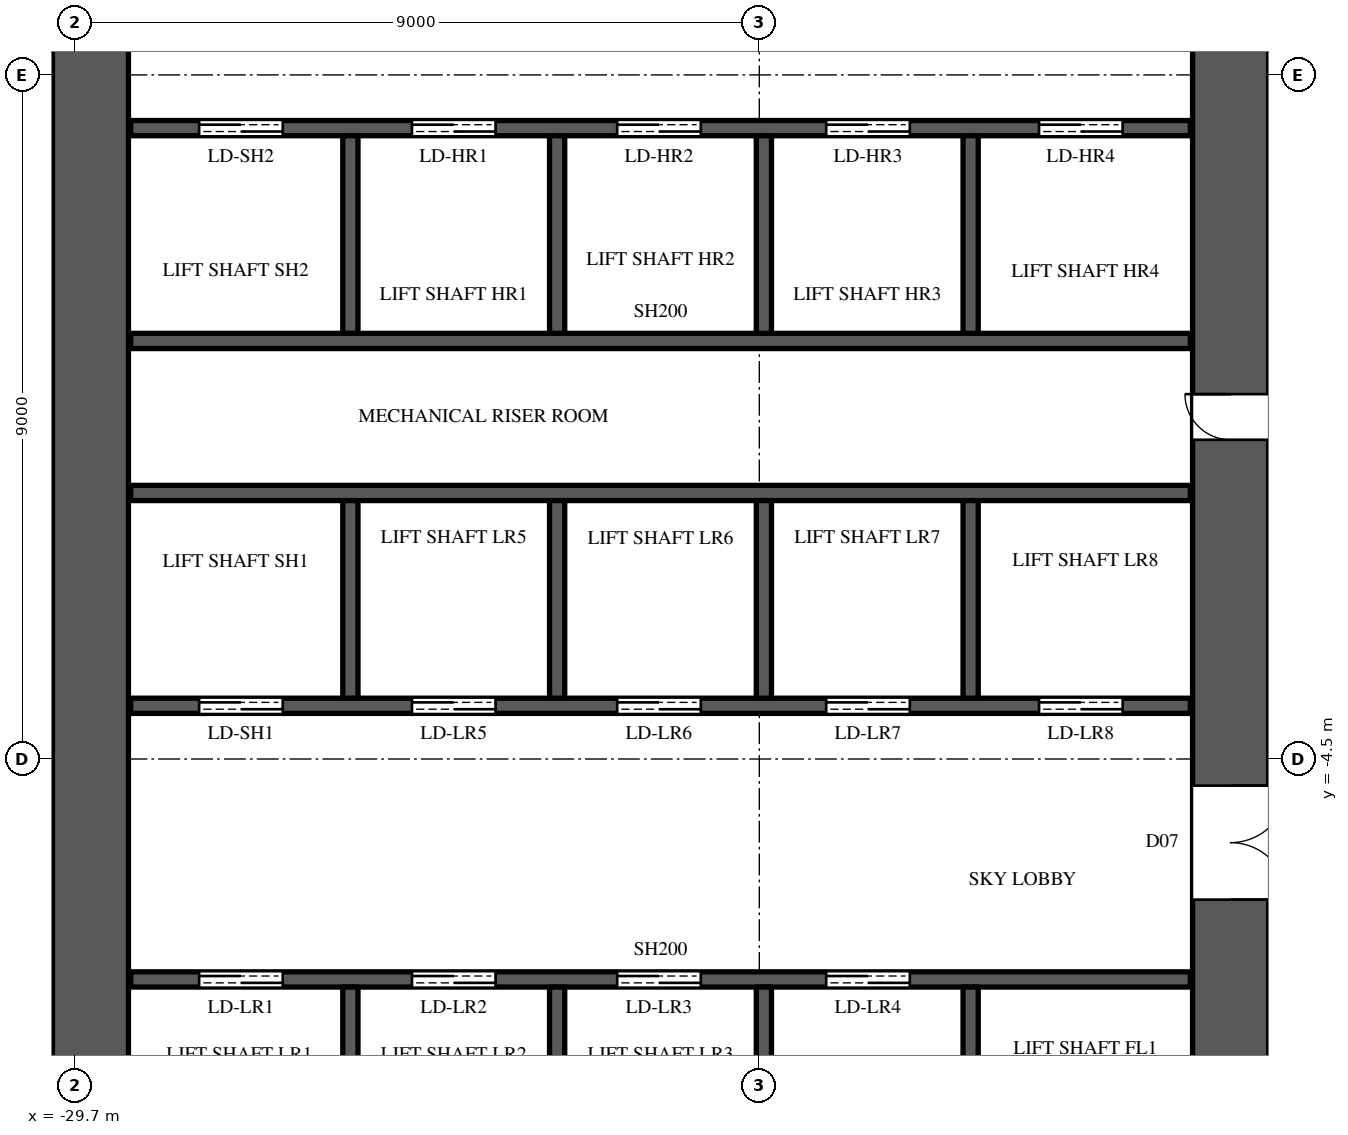
"""IFC4 building model, lengths in metres.
Left out: names, types, materials, properties, quantities, classifications, styles, units other than length and angle.
Written with IfcOpenShell. Run it as: python <this file> out.ifc"""

import sys

from ifc_helpers import new_model, si_unit, direction, frame, frame_2d, origin, place, context, subcontext, project, spatial, rectangle, extrude, element, fill, save


model = new_model("IFC4")
c1 = context("Model", 3, precision=1e-05, world=origin(), true_north=direction((0.0, 1.0)))
c2 = subcontext(c1, "Body", "Model", "MODEL_VIEW")
j1 = project(units=[si_unit("LENGTHUNIT", "METRE"), si_unit("PLANEANGLEUNIT", "RADIAN")], contexts=[c1])
p1 = place(None, origin())
s1 = spatial("IfcSite", under=j1, at=p1, CompositionType="ELEMENT")
p2 = place(p1, origin())
s2 = spatial("IfcBuilding", under=s1, at=p2, CompositionType="ELEMENT")
p3 = place(p2, frame((0.0, 0.0, 145.5)))
s3 = spatial("IfcBuildingStorey", under=s2, at=p3, CompositionType="ELEMENT", Elevation=145.5)
p4 = place(p3, frame((-14.5, -14.8, 0.0), z_axis=(0.0, 0.0, 1.0), x_axis=(0.0, 1.0, 0.0)))
e1 = element("IfcWall", 1, at=p4, inside=s3, PredefinedType="SHEAR", context=c2, shape_type="SweptSolid", body=[
    extrude(rectangle(XDim=29.6, YDim=1.0, at=frame_2d((14.8, 0.0))), origin(), (0.0, 0.0, 1.0), 7.0),
])
p5 = place(p4, frame((1.55, 0.0, 0.0)))
e2 = element("IfcOpeningElement", 2, at=p5, cuts=e1, PredefinedType="OPENING", context=c2, shape_type="SweptSolid", body=[
    extrude(rectangle(XDim=1.5, YDim=2.4, at=frame_2d((0.75, 1.2))), frame((0.0, 0.51, 0.0), z_axis=(0.0, -1.0, 0.0), x_axis=(1.0, 0.0, 0.0)), (0.0, 0.0, 1.0), 1.02),
])
p6 = place(p4, frame((26.55, 0.0, 0.0)))
e3 = element("IfcOpeningElement", 3, at=p6, cuts=e1, PredefinedType="OPENING", context=c2, shape_type="SweptSolid", body=[
    extrude(rectangle(XDim=1.5, YDim=2.4, at=frame_2d((0.75, 1.2))), frame((0.0, 0.51, 0.0), z_axis=(0.0, -1.0, 0.0), x_axis=(1.0, 0.0, 0.0)), (0.0, 0.0, 1.0), 1.02),
])
p7 = place(p4, frame((8.45, 0.0, 0.0)))
e4 = element("IfcOpeningElement", 4, at=p7, cuts=e1, PredefinedType="OPENING", context=c2, shape_type="SweptSolid", body=[
    extrude(rectangle(XDim=1.5, YDim=2.4, at=frame_2d((0.75, 1.2))), frame((0.0, 0.51, 0.0), z_axis=(0.0, -1.0, 0.0), x_axis=(1.0, 0.0, 0.0)), (0.0, 0.0, 1.0), 1.02),
])
p8 = place(p4, frame((19.65, 0.0, 0.0)))
e5 = element("IfcOpeningElement", 5, at=p8, cuts=e1, PredefinedType="OPENING", context=c2, shape_type="SweptSolid", body=[
    extrude(rectangle(XDim=1.5, YDim=2.4, at=frame_2d((0.75, 1.2))), frame((0.0, 0.51, 0.0), z_axis=(0.0, -1.0, 0.0), x_axis=(1.0, 0.0, 0.0)), (0.0, 0.0, 1.0), 1.02),
])
p9 = place(p4, frame((14.5, 0.0, 0.0)))
e6 = element("IfcOpeningElement", 6, at=p9, cuts=e1, PredefinedType="OPENING", context=c2, shape_type="SweptSolid", body=[
    extrude(rectangle(XDim=0.6, YDim=2.0, at=frame_2d((0.3, 1.0))), frame((0.0, 0.51, 0.0), z_axis=(0.0, -1.0, 0.0), x_axis=(1.0, 0.0, 0.0)), (0.0, 0.0, 1.0), 1.02),
])
p10 = place(p3, frame((-29.5, -10.2, 0.0), z_axis=(0.0, 0.0, 1.0), x_axis=(0.0, 1.0, 0.0)))
e7 = element("IfcWall", 7, at=p10, inside=s3, PredefinedType="SHEAR", context=c2, shape_type="SweptSolid", body=[
    extrude(rectangle(XDim=20.4, YDim=1.0, at=frame_2d((10.2, 0.0))), origin(), (0.0, 0.0, 1.0), 7.0),
])
p11 = place(p3, frame((-28.97, -7.4, 0.0), z_axis=(0.0, 0.0, 1.0), x_axis=(1.0, 0.0, 0.0)))
e8 = element("IfcWall", 8, at=p11, inside=s3, PredefinedType="SHEAR", context=c2, shape_type="SweptSolid", body=[
    extrude(rectangle(XDim=13.94, YDim=0.2, at=frame_2d((6.97, 0.0))), origin(), (0.0, 0.0, 1.0), 6.7),
])
p12 = place(p11, frame((0.9, 0.0, 0.0)))
e9 = element("IfcOpeningElement", 9, at=p12, cuts=e8, PredefinedType="OPENING", context=c2, shape_type="SweptSolid", body=[
    extrude(rectangle(XDim=1.1, YDim=2.2, at=frame_2d((0.55, 1.1))), frame((0.0, 0.11, 0.0), z_axis=(0.0, -1.0, 0.0), x_axis=(1.0, 0.0, 0.0)), (0.0, 0.0, 1.0), 0.22),
])
p13 = place(p11, frame((3.7, 0.0, 0.0)))
e10 = element("IfcOpeningElement", 10, at=p13, cuts=e8, PredefinedType="OPENING", context=c2, shape_type="SweptSolid", body=[
    extrude(rectangle(XDim=1.1, YDim=2.2, at=frame_2d((0.55, 1.1))), frame((0.0, 0.11, 0.0), z_axis=(0.0, -1.0, 0.0), x_axis=(1.0, 0.0, 0.0)), (0.0, 0.0, 1.0), 0.22),
])
p14 = place(p11, frame((6.4, 0.0, 0.0)))
e11 = element("IfcOpeningElement", 11, at=p14, cuts=e8, PredefinedType="OPENING", context=c2, shape_type="SweptSolid", body=[
    extrude(rectangle(XDim=1.1, YDim=2.2, at=frame_2d((0.55, 1.1))), frame((0.0, 0.11, 0.0), z_axis=(0.0, -1.0, 0.0), x_axis=(1.0, 0.0, 0.0)), (0.0, 0.0, 1.0), 0.22),
])
p15 = place(p11, frame((9.15, 0.0, 0.0)))
e12 = element("IfcOpeningElement", 12, at=p15, cuts=e8, PredefinedType="OPENING", context=c2, shape_type="SweptSolid", body=[
    extrude(rectangle(XDim=1.1, YDim=2.2, at=frame_2d((0.55, 1.1))), frame((0.0, 0.11, 0.0), z_axis=(0.0, -1.0, 0.0), x_axis=(1.0, 0.0, 0.0)), (0.0, 0.0, 1.0), 0.22),
])
p16 = place(p3, frame((-28.97, -3.8, 0.0), z_axis=(0.0, 0.0, 1.0), x_axis=(1.0, 0.0, 0.0)))
e13 = element("IfcWall", 13, at=p16, inside=s3, PredefinedType="SHEAR", context=c2, shape_type="SweptSolid", body=[
    extrude(rectangle(XDim=13.94, YDim=0.2, at=frame_2d((6.97, 0.0))), origin(), (0.0, 0.0, 1.0), 6.7),
])
p17 = place(p16, frame((0.9, 0.0, 0.0)))
e14 = element("IfcOpeningElement", 14, at=p17, cuts=e13, PredefinedType="OPENING", context=c2, shape_type="SweptSolid", body=[
    extrude(rectangle(XDim=1.1, YDim=2.2, at=frame_2d((0.55, 1.1))), frame((0.0, 0.11, 0.0), z_axis=(0.0, -1.0, 0.0), x_axis=(1.0, 0.0, 0.0)), (0.0, 0.0, 1.0), 0.22),
])
p18 = place(p16, frame((3.7, 0.0, 0.0)))
e15 = element("IfcOpeningElement", 15, at=p18, cuts=e13, PredefinedType="OPENING", context=c2, shape_type="SweptSolid", body=[
    extrude(rectangle(XDim=1.1, YDim=2.2, at=frame_2d((0.55, 1.1))), frame((0.0, 0.11, 0.0), z_axis=(0.0, -1.0, 0.0), x_axis=(1.0, 0.0, 0.0)), (0.0, 0.0, 1.0), 0.22),
])
p19 = place(p16, frame((6.4, 0.0, 0.0)))
e16 = element("IfcOpeningElement", 16, at=p19, cuts=e13, PredefinedType="OPENING", context=c2, shape_type="SweptSolid", body=[
    extrude(rectangle(XDim=1.1, YDim=2.2, at=frame_2d((0.55, 1.1))), frame((0.0, 0.11, 0.0), z_axis=(0.0, -1.0, 0.0), x_axis=(1.0, 0.0, 0.0)), (0.0, 0.0, 1.0), 0.22),
])
p20 = place(p16, frame((9.15, 0.0, 0.0)))
e17 = element("IfcOpeningElement", 17, at=p20, cuts=e13, PredefinedType="OPENING", context=c2, shape_type="SweptSolid", body=[
    extrude(rectangle(XDim=1.1, YDim=2.2, at=frame_2d((0.55, 1.1))), frame((0.0, 0.11, 0.0), z_axis=(0.0, -1.0, 0.0), x_axis=(1.0, 0.0, 0.0)), (0.0, 0.0, 1.0), 0.22),
])
p21 = place(p16, frame((11.95, 0.0, 0.0)))
e18 = element("IfcOpeningElement", 18, at=p21, cuts=e13, PredefinedType="OPENING", context=c2, shape_type="SweptSolid", body=[
    extrude(rectangle(XDim=1.1, YDim=2.2, at=frame_2d((0.55, 1.1))), frame((0.0, 0.11, 0.0), z_axis=(0.0, -1.0, 0.0), x_axis=(1.0, 0.0, 0.0)), (0.0, 0.0, 1.0), 0.22),
])
for number, where, z_axis, x_axis in (
    (19, (-28.97, -1.0, 0.0), (0.0, 0.0, 1.0), (1.0, 0.0, 0.0)),
    (20, (-28.97, 1.0, 0.0), (0.0, 0.0, 1.0), (1.0, 0.0, 0.0)),
):
    element("IfcWall", number, at=place(p3, frame(where, z_axis=z_axis, x_axis=x_axis)), inside=s3, PredefinedType="SHEAR", context=c2, shape_type="SweptSolid", body=[
        extrude(rectangle(XDim=13.94, YDim=0.2, at=frame_2d((6.97, 0.0))), origin(), (0.0, 0.0, 1.0), 6.7),
    ])
p22 = place(p3, frame((-28.97, 3.8, 0.0), z_axis=(0.0, 0.0, 1.0), x_axis=(1.0, 0.0, 0.0)))
e21 = element("IfcWall", 21, at=p22, inside=s3, PredefinedType="SHEAR", context=c2, shape_type="SweptSolid", body=[
    extrude(rectangle(XDim=13.94, YDim=0.2, at=frame_2d((6.97, 0.0))), origin(), (0.0, 0.0, 1.0), 6.7),
])
p23 = place(p22, frame((0.9, 0.0, 0.0)))
e22 = element("IfcOpeningElement", 22, at=p23, cuts=e21, PredefinedType="OPENING", context=c2, shape_type="SweptSolid", body=[
    extrude(rectangle(XDim=1.1, YDim=2.2, at=frame_2d((0.55, 1.1))), frame((0.0, 0.11, 0.0), z_axis=(0.0, -1.0, 0.0), x_axis=(1.0, 0.0, 0.0)), (0.0, 0.0, 1.0), 0.22),
])
p24 = place(p22, frame((3.7, 0.0, 0.0)))
e23 = element("IfcOpeningElement", 23, at=p24, cuts=e21, PredefinedType="OPENING", context=c2, shape_type="SweptSolid", body=[
    extrude(rectangle(XDim=1.1, YDim=2.2, at=frame_2d((0.55, 1.1))), frame((0.0, 0.11, 0.0), z_axis=(0.0, -1.0, 0.0), x_axis=(1.0, 0.0, 0.0)), (0.0, 0.0, 1.0), 0.22),
])
p25 = place(p22, frame((6.4, 0.0, 0.0)))
e24 = element("IfcOpeningElement", 24, at=p25, cuts=e21, PredefinedType="OPENING", context=c2, shape_type="SweptSolid", body=[
    extrude(rectangle(XDim=1.1, YDim=2.2, at=frame_2d((0.55, 1.1))), frame((0.0, 0.11, 0.0), z_axis=(0.0, -1.0, 0.0), x_axis=(1.0, 0.0, 0.0)), (0.0, 0.0, 1.0), 0.22),
])
p26 = place(p22, frame((9.15, 0.0, 0.0)))
e25 = element("IfcOpeningElement", 25, at=p26, cuts=e21, PredefinedType="OPENING", context=c2, shape_type="SweptSolid", body=[
    extrude(rectangle(XDim=1.1, YDim=2.2, at=frame_2d((0.55, 1.1))), frame((0.0, 0.11, 0.0), z_axis=(0.0, -1.0, 0.0), x_axis=(1.0, 0.0, 0.0)), (0.0, 0.0, 1.0), 0.22),
])
p27 = place(p22, frame((11.95, 0.0, 0.0)))
e26 = element("IfcOpeningElement", 26, at=p27, cuts=e21, PredefinedType="OPENING", context=c2, shape_type="SweptSolid", body=[
    extrude(rectangle(XDim=1.1, YDim=2.2, at=frame_2d((0.55, 1.1))), frame((0.0, 0.11, 0.0), z_axis=(0.0, -1.0, 0.0), x_axis=(1.0, 0.0, 0.0)), (0.0, 0.0, 1.0), 0.22),
])
p28 = place(p3, frame((-26.08, -10.075, 0.0), z_axis=(0.0, 0.0, 1.0), x_axis=(0.0, 1.0, 0.0)))
e27 = element("IfcWall", 27, at=p28, inside=s3, PredefinedType="SHEAR", context=c2, shape_type="SweptSolid", body=[
    extrude(rectangle(XDim=2.575, YDim=0.2, at=frame_2d((1.288, 0.0))), origin(), (0.0, 0.0, 1.0), 6.7),
])
for number, where, z_axis, x_axis in (
    (28, (-26.08, -3.7, 0.0), (0.0, 0.0, 1.0), (0.0, 1.0, 0.0)),
    (29, (-26.08, 1.1, 0.0), (0.0, 0.0, 1.0), (0.0, 1.0, 0.0)),
):
    element("IfcWall", number, at=place(p3, frame(where, z_axis=z_axis, x_axis=x_axis)), inside=s3, PredefinedType="SHEAR", context=c2, shape_type="SweptSolid", body=[
        extrude(rectangle(XDim=2.6, YDim=0.2, at=frame_2d((1.3, 0.0))), origin(), (0.0, 0.0, 1.0), 6.7),
    ])
p29 = place(p3, frame((-23.36, -10.075, 0.0), z_axis=(0.0, 0.0, 1.0), x_axis=(0.0, 1.0, 0.0)))
e30 = element("IfcWall", 30, at=p29, inside=s3, PredefinedType="SHEAR", context=c2, shape_type="SweptSolid", body=[
    extrude(rectangle(XDim=2.575, YDim=0.2, at=frame_2d((1.288, 0.0))), origin(), (0.0, 0.0, 1.0), 6.7),
])
p30 = place(p3, frame((-23.36, -3.7, 0.0), z_axis=(0.0, 0.0, 1.0), x_axis=(0.0, 1.0, 0.0)))
e31 = element("IfcWall", 31, at=p30, inside=s3, PredefinedType="SHEAR", context=c2, shape_type="SweptSolid", body=[
    extrude(rectangle(XDim=2.6, YDim=0.2, at=frame_2d((1.3, 0.0))), origin(), (0.0, 0.0, 1.0), 6.7),
])
p31 = place(p3, frame((-23.36, 1.1, -1.0), z_axis=(0.0, 0.0, 1.0), x_axis=(0.0, 1.0, 0.0)))
e32 = element("IfcWall", 32, at=p31, inside=s3, PredefinedType="SHEAR", context=c2, shape_type="SweptSolid", body=[
    extrude(rectangle(XDim=2.6, YDim=0.2, at=frame_2d((1.3, 0.0))), origin(), (0.0, 0.0, 1.0), 8.0),
])
p32 = place(p3, frame((-20.64, -10.075, 0.0), z_axis=(0.0, 0.0, 1.0), x_axis=(0.0, 1.0, 0.0)))
e33 = element("IfcWall", 33, at=p32, inside=s3, PredefinedType="SHEAR", context=c2, shape_type="SweptSolid", body=[
    extrude(rectangle(XDim=2.575, YDim=0.2, at=frame_2d((1.288, 0.0))), origin(), (0.0, 0.0, 1.0), 6.7),
])
p33 = place(p3, frame((-20.64, -3.7, 0.0), z_axis=(0.0, 0.0, 1.0), x_axis=(0.0, 1.0, 0.0)))
e34 = element("IfcWall", 34, at=p33, inside=s3, PredefinedType="SHEAR", context=c2, shape_type="SweptSolid", body=[
    extrude(rectangle(XDim=2.6, YDim=0.2, at=frame_2d((1.3, 0.0))), origin(), (0.0, 0.0, 1.0), 6.7),
])
p34 = place(p3, frame((-20.64, 1.1, -1.0), z_axis=(0.0, 0.0, 1.0), x_axis=(0.0, 1.0, 0.0)))
e35 = element("IfcWall", 35, at=p34, inside=s3, PredefinedType="SHEAR", context=c2, shape_type="SweptSolid", body=[
    extrude(rectangle(XDim=2.6, YDim=0.2, at=frame_2d((1.3, 0.0))), origin(), (0.0, 0.0, 1.0), 8.0),
])
p35 = place(p3, frame((-17.92, -10.1, 0.0), z_axis=(0.0, 0.0, 1.0), x_axis=(0.0, 1.0, 0.0)))
e36 = element("IfcWall", 36, at=p35, inside=s3, PredefinedType="SHEAR", context=c2, shape_type="SweptSolid", body=[
    extrude(rectangle(XDim=2.6, YDim=0.2, at=frame_2d((1.3, 0.0))), origin(), (0.0, 0.0, 1.0), 6.7),
])
p36 = place(p3, frame((-17.92, -3.7, 0.0), z_axis=(0.0, 0.0, 1.0), x_axis=(0.0, 1.0, 0.0)))
e37 = element("IfcWall", 37, at=p36, inside=s3, PredefinedType="SHEAR", context=c2, shape_type="SweptSolid", body=[
    extrude(rectangle(XDim=2.6, YDim=0.2, at=frame_2d((1.3, 0.0))), origin(), (0.0, 0.0, 1.0), 6.7),
])
p37 = place(p3, frame((-17.92, 1.1, -1.0), z_axis=(0.0, 0.0, 1.0), x_axis=(0.0, 1.0, 0.0)))
e38 = element("IfcWall", 38, at=p37, inside=s3, PredefinedType="SHEAR", context=c2, shape_type="SweptSolid", body=[
    extrude(rectangle(XDim=2.6, YDim=0.2, at=frame_2d((1.3, 0.0))), origin(), (0.0, 0.0, 1.0), 8.0),
])
p38 = place(p12, origin())
e39 = element("IfcDoor", 39, at=p38, inside=s3, OperationType="DOUBLE_DOOR_SLIDING", PredefinedType="DOOR", context=c2, shape_type="SweptSolid", body=[
    extrude(rectangle(XDim=1.1, YDim=2.2, at=frame_2d((0.55, 1.1))), frame((0.0, 0.025, 0.0), z_axis=(0.0, -1.0, 0.0), x_axis=(1.0, 0.0, 0.0)), (0.0, 0.0, 1.0), 0.05),
])
fill(e9, e39)
p39 = place(p13, origin())
e40 = element("IfcDoor", 40, at=p39, inside=s3, OperationType="DOUBLE_DOOR_SLIDING", PredefinedType="DOOR", context=c2, shape_type="SweptSolid", body=[
    extrude(rectangle(XDim=1.1, YDim=2.2, at=frame_2d((0.55, 1.1))), frame((0.0, 0.025, 0.0), z_axis=(0.0, -1.0, 0.0), x_axis=(1.0, 0.0, 0.0)), (0.0, 0.0, 1.0), 0.05),
])
fill(e10, e40)
p40 = place(p14, origin())
e41 = element("IfcDoor", 41, at=p40, inside=s3, OperationType="DOUBLE_DOOR_SLIDING", PredefinedType="DOOR", context=c2, shape_type="SweptSolid", body=[
    extrude(rectangle(XDim=1.1, YDim=2.2, at=frame_2d((0.55, 1.1))), frame((0.0, 0.025, 0.0), z_axis=(0.0, -1.0, 0.0), x_axis=(1.0, 0.0, 0.0)), (0.0, 0.0, 1.0), 0.05),
])
fill(e11, e41)
p41 = place(p15, origin())
e42 = element("IfcDoor", 42, at=p41, inside=s3, OperationType="DOUBLE_DOOR_SLIDING", PredefinedType="DOOR", context=c2, shape_type="SweptSolid", body=[
    extrude(rectangle(XDim=1.1, YDim=2.2, at=frame_2d((0.55, 1.1))), frame((0.0, 0.025, 0.0), z_axis=(0.0, -1.0, 0.0), x_axis=(1.0, 0.0, 0.0)), (0.0, 0.0, 1.0), 0.05),
])
fill(e12, e42)
p42 = place(p17, origin())
e43 = element("IfcDoor", 43, at=p42, inside=s3, OperationType="DOUBLE_DOOR_SLIDING", PredefinedType="DOOR", context=c2, shape_type="SweptSolid", body=[
    extrude(rectangle(XDim=1.1, YDim=2.2, at=frame_2d((0.55, 1.1))), frame((0.0, 0.025, 0.0), z_axis=(0.0, -1.0, 0.0), x_axis=(1.0, 0.0, 0.0)), (0.0, 0.0, 1.0), 0.05),
])
fill(e14, e43)
p43 = place(p18, origin())
e44 = element("IfcDoor", 44, at=p43, inside=s3, OperationType="DOUBLE_DOOR_SLIDING", PredefinedType="DOOR", context=c2, shape_type="SweptSolid", body=[
    extrude(rectangle(XDim=1.1, YDim=2.2, at=frame_2d((0.55, 1.1))), frame((0.0, 0.025, 0.0), z_axis=(0.0, -1.0, 0.0), x_axis=(1.0, 0.0, 0.0)), (0.0, 0.0, 1.0), 0.05),
])
fill(e15, e44)
p44 = place(p19, origin())
e45 = element("IfcDoor", 45, at=p44, inside=s3, OperationType="DOUBLE_DOOR_SLIDING", PredefinedType="DOOR", context=c2, shape_type="SweptSolid", body=[
    extrude(rectangle(XDim=1.1, YDim=2.2, at=frame_2d((0.55, 1.1))), frame((0.0, 0.025, 0.0), z_axis=(0.0, -1.0, 0.0), x_axis=(1.0, 0.0, 0.0)), (0.0, 0.0, 1.0), 0.05),
])
fill(e16, e45)
p45 = place(p20, origin())
e46 = element("IfcDoor", 46, at=p45, inside=s3, OperationType="DOUBLE_DOOR_SLIDING", PredefinedType="DOOR", context=c2, shape_type="SweptSolid", body=[
    extrude(rectangle(XDim=1.1, YDim=2.2, at=frame_2d((0.55, 1.1))), frame((0.0, 0.025, 0.0), z_axis=(0.0, -1.0, 0.0), x_axis=(1.0, 0.0, 0.0)), (0.0, 0.0, 1.0), 0.05),
])
fill(e17, e46)
p46 = place(p21, origin())
e47 = element("IfcDoor", 47, at=p46, inside=s3, OperationType="DOUBLE_DOOR_SLIDING", PredefinedType="DOOR", context=c2, shape_type="SweptSolid", body=[
    extrude(rectangle(XDim=1.1, YDim=2.2, at=frame_2d((0.55, 1.1))), frame((0.0, 0.025, 0.0), z_axis=(0.0, -1.0, 0.0), x_axis=(1.0, 0.0, 0.0)), (0.0, 0.0, 1.0), 0.05),
])
fill(e18, e47)
p47 = place(p23, origin())
e48 = element("IfcDoor", 48, at=p47, inside=s3, OperationType="DOUBLE_DOOR_SLIDING", PredefinedType="DOOR", context=c2, shape_type="SweptSolid", body=[
    extrude(rectangle(XDim=1.1, YDim=2.2, at=frame_2d((0.55, 1.1))), frame((0.0, 0.025, 0.0), z_axis=(0.0, -1.0, 0.0), x_axis=(1.0, 0.0, 0.0)), (0.0, 0.0, 1.0), 0.05),
])
fill(e22, e48)
p48 = place(p24, origin())
e49 = element("IfcDoor", 49, at=p48, inside=s3, OperationType="DOUBLE_DOOR_SLIDING", PredefinedType="DOOR", context=c2, shape_type="SweptSolid", body=[
    extrude(rectangle(XDim=1.1, YDim=2.2, at=frame_2d((0.55, 1.1))), frame((0.0, 0.025, 0.0), z_axis=(0.0, -1.0, 0.0), x_axis=(1.0, 0.0, 0.0)), (0.0, 0.0, 1.0), 0.05),
])
fill(e23, e49)
p49 = place(p25, origin())
e50 = element("IfcDoor", 50, at=p49, inside=s3, OperationType="DOUBLE_DOOR_SLIDING", PredefinedType="DOOR", context=c2, shape_type="SweptSolid", body=[
    extrude(rectangle(XDim=1.1, YDim=2.2, at=frame_2d((0.55, 1.1))), frame((0.0, 0.025, 0.0), z_axis=(0.0, -1.0, 0.0), x_axis=(1.0, 0.0, 0.0)), (0.0, 0.0, 1.0), 0.05),
])
fill(e24, e50)
p50 = place(p26, origin())
e51 = element("IfcDoor", 51, at=p50, inside=s3, OperationType="DOUBLE_DOOR_SLIDING", PredefinedType="DOOR", context=c2, shape_type="SweptSolid", body=[
    extrude(rectangle(XDim=1.1, YDim=2.2, at=frame_2d((0.55, 1.1))), frame((0.0, 0.025, 0.0), z_axis=(0.0, -1.0, 0.0), x_axis=(1.0, 0.0, 0.0)), (0.0, 0.0, 1.0), 0.05),
])
fill(e25, e51)
p51 = place(p27, origin())
e52 = element("IfcDoor", 52, at=p51, inside=s3, OperationType="DOUBLE_DOOR_SLIDING", PredefinedType="DOOR", context=c2, shape_type="SweptSolid", body=[
    extrude(rectangle(XDim=1.1, YDim=2.2, at=frame_2d((0.55, 1.1))), frame((0.0, 0.025, 0.0), z_axis=(0.0, -1.0, 0.0), x_axis=(1.0, 0.0, 0.0)), (0.0, 0.0, 1.0), 0.05),
])
fill(e26, e52)
p52 = place(p7, origin())
e53 = element("IfcDoor", 53, at=p52, inside=s3, OperationType="DOUBLE_DOOR_SINGLE_SWING", PredefinedType="DOOR", context=c2, shape_type="SweptSolid", body=[
    extrude(rectangle(XDim=1.5, YDim=2.4, at=frame_2d((0.75, 1.2))), frame((0.0, -0.445, 0.0), z_axis=(0.0, -1.0, 0.0), x_axis=(1.0, 0.0, 0.0)), (0.0, 0.0, 1.0), 0.05),
])
fill(e4, e53)
p53 = place(p9, origin())
e54 = element("IfcDoor", 54, at=p53, inside=s3, OperationType="SINGLE_SWING_RIGHT", PredefinedType="DOOR", context=c2, shape_type="SweptSolid", body=[
    extrude(rectangle(XDim=0.6, YDim=2.0, at=frame_2d((0.3, 1.0))), frame((0.0, 0.495, 0.0), z_axis=(0.0, -1.0, 0.0), x_axis=(1.0, 0.0, 0.0)), (0.0, 0.0, 1.0), 0.05),
])
fill(e6, e54)
save(model, sys.argv[1])
